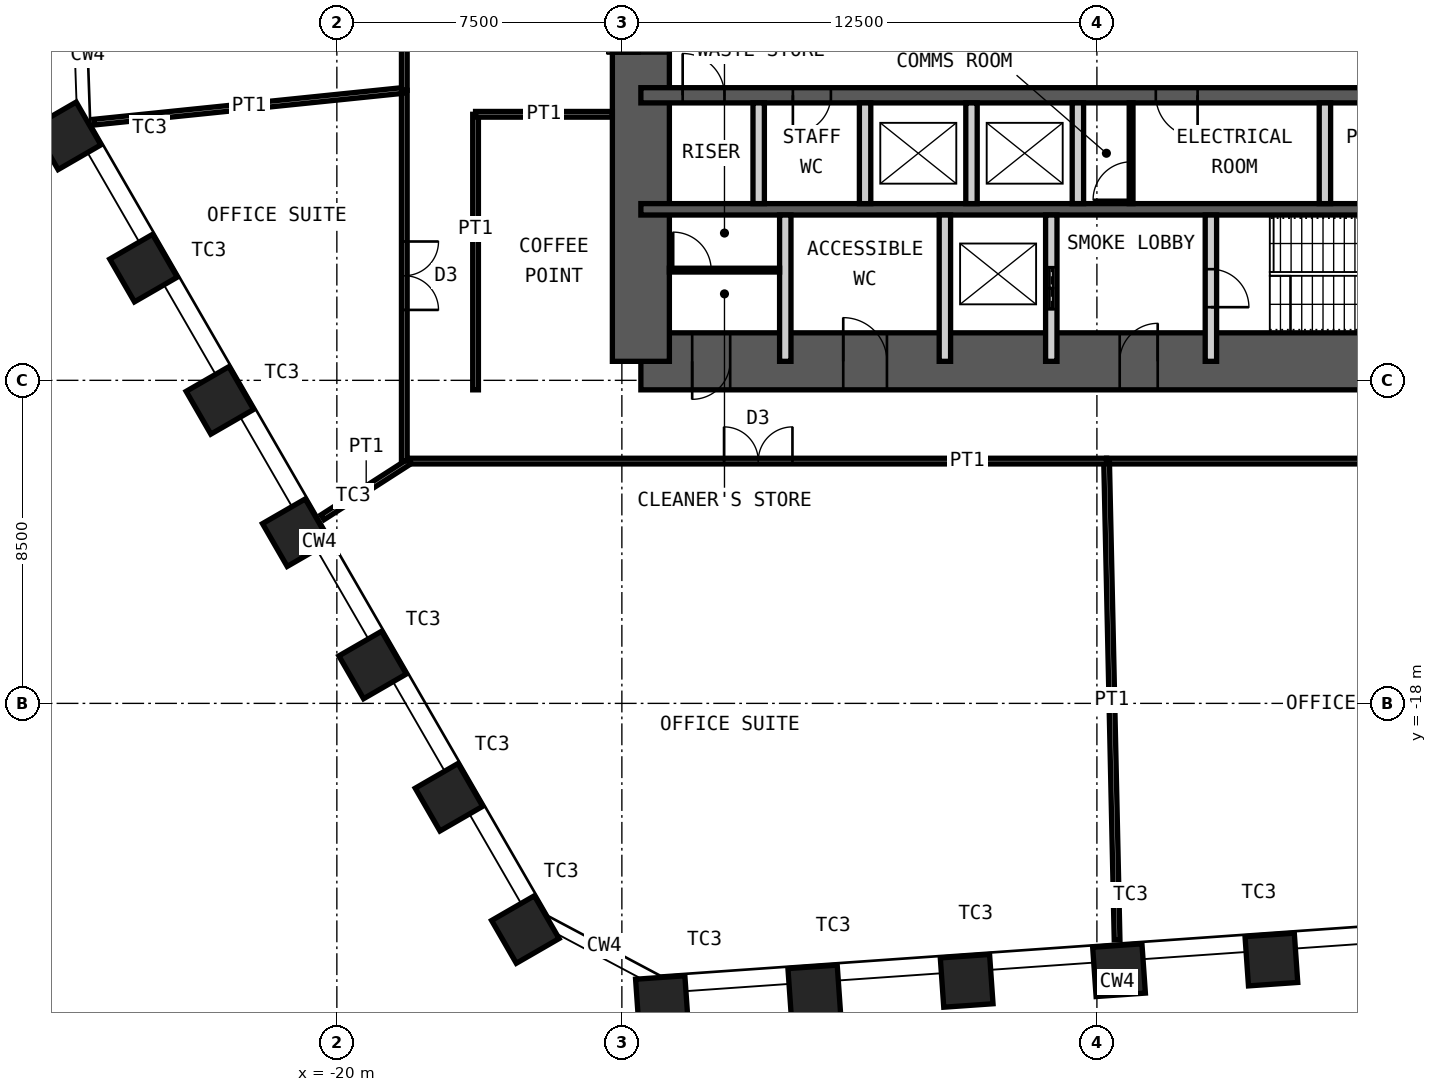
"""IFC4 building model, lengths in metres.
Left out: names, types, materials, properties, quantities, classifications, styles, units other than length and angle.
Written with IfcOpenShell. Run it as: python <this file> out.ifc"""

import sys

from ifc_helpers import new_model, si_unit, direction, frame, frame_2d, origin, origin_2d, place, context, subcontext, project, spatial, rectangle, hollow_rectangle, extrude, element, fill, save


model = new_model("IFC4")
c1 = context("Model", 3, precision=1e-05, world=origin(), true_north=direction((0.0, 1.0)))
c2 = subcontext(c1, "Body", "Model", "MODEL_VIEW")
j1 = project(units=[si_unit("LENGTHUNIT", "METRE"), si_unit("PLANEANGLEUNIT", "RADIAN")], contexts=[c1])
p1 = place(None, origin())
s1 = spatial("IfcSite", under=j1, at=p1, CompositionType="ELEMENT")
p2 = place(p1, origin())
s2 = spatial("IfcBuilding", under=s1, at=p2, CompositionType="ELEMENT")
p3 = place(p2, frame((0.0, 0.0, 136.6)))
s3 = spatial("IfcBuildingStorey", under=s2, at=p3, CompositionType="ELEMENT", Elevation=136.6)
for number, where, z_axis, x_axis in (
    (1, (4.592, -24.74, 0.0), (0.0, 0.0, 1.0), (0.998, 0.07, 0.0)),
    (2, (0.582, -25.02, 0.0), (0.0, 0.0, 1.0), (0.998, 0.07, 0.0)),
    (3, (-3.427, -25.301, 0.0), (0.0, 0.0, 1.0), (0.998, 0.07, 0.0)),
    (4, (-7.436, -25.581, 0.0), (0.0, 0.0, 1.0), (0.998, 0.07, 0.0)),
    (5, (-11.446, -25.861, 0.0), (0.0, 0.0, 1.0), (0.998, 0.07, 0.0)),
    (6, (-15.04, -23.95, 0.0), (0.0, 0.0, 1.0), (0.5, -0.866, 0.0)),
    (7, (-17.049, -20.47, 0.0), (0.0, 0.0, 1.0), (0.5, -0.866, 0.0)),
    (8, (-19.059, -16.989, 0.0), (0.0, 0.0, 1.0), (0.5, -0.866, 0.0)),
    (9, (-21.068, -13.509, 0.0), (0.0, 0.0, 1.0), (0.5, -0.866, 0.0)),
    (10, (-23.078, -10.028, 0.0), (0.0, 0.0, 1.0), (0.5, -0.866, 0.0)),
    (11, (-25.087, -6.547, 0.0), (0.0, 0.0, 1.0), (0.5, -0.866, 0.0)),
    (12, (-27.097, -3.067, 0.0), (0.0, 0.0, 1.0), (0.5, -0.866, 0.0)),
):
    element("IfcColumn", number, at=place(p3, frame(where, z_axis=z_axis, x_axis=x_axis)), inside=s3, PredefinedType="COLUMN", context=c2, shape_type="SweptSolid", body=[
        extrude(hollow_rectangle(XDim=1.3, YDim=1.3, WallThickness=0.1, at=origin_2d()), origin(), (0.0, 0.0, 1.0), 4.2),
    ])
p4 = place(p3, frame((-12.0, -9.0, 0.0), z_axis=(0.0, 0.0, 1.0), x_axis=(1.0, 0.0, 0.0)))
e13 = element("IfcWall", 13, at=p4, inside=s3, PredefinedType="SHEAR", context=c2, shape_type="SweptSolid", body=[
    extrude(rectangle(XDim=24.0, YDim=1.5, at=frame_2d((12.0, 0.0))), origin(), (0.0, 0.0, 1.0), 4.2),
])
p5 = place(p4, frame((1.35, 0.0, 0.0)))
e14 = element("IfcOpeningElement", 14, at=p5, cuts=e13, PredefinedType="OPENING", context=c2, shape_type="SweptSolid", body=[
    extrude(rectangle(XDim=1.0, YDim=2.1, at=frame_2d((0.5, 1.05))), frame((0.0, 0.76, 0.0), z_axis=(0.0, -1.0, 0.0), x_axis=(1.0, 0.0, 0.0)), (0.0, 0.0, 1.0), 1.52),
])
p6 = place(p4, frame((5.325, 0.0, 0.0)))
e15 = element("IfcOpeningElement", 15, at=p6, cuts=e13, PredefinedType="OPENING", context=c2, shape_type="SweptSolid", body=[
    extrude(rectangle(XDim=1.15, YDim=2.1, at=frame_2d((0.575, 1.05))), frame((0.0, 0.76, 0.0), z_axis=(0.0, -1.0, 0.0), x_axis=(1.0, 0.0, 0.0)), (0.0, 0.0, 1.0), 1.52),
])
p7 = place(p4, frame((12.6, 0.0, 0.0)))
e16 = element("IfcOpeningElement", 16, at=p7, cuts=e13, PredefinedType="OPENING", context=c2, shape_type="SweptSolid", body=[
    extrude(rectangle(XDim=1.0, YDim=2.1, at=frame_2d((0.5, 1.05))), frame((0.0, 0.76, 0.0), z_axis=(0.0, -1.0, 0.0), x_axis=(1.0, 0.0, 0.0)), (0.0, 0.0, 1.0), 1.52),
])
p8 = place(p3, frame((-12.0, -9.0, 0.0), z_axis=(0.0, 0.0, 1.0), x_axis=(0.0, 1.0, 0.0)))
e17 = element("IfcWall", 17, at=p8, inside=s3, PredefinedType="SHEAR", context=c2, shape_type="SweptSolid", body=[
    extrude(rectangle(XDim=18.0, YDim=1.5, at=frame_2d((9.0, 0.0))), origin(), (0.0, 0.0, 1.0), 4.2),
])
p9 = place(p8, frame((8.1, 0.0, 0.0)))
e18 = element("IfcOpeningElement", 18, at=p9, cuts=e17, PredefinedType="OPENING", context=c2, shape_type="SweptSolid", body=[
    extrude(rectangle(XDim=1.8, YDim=2.1, at=frame_2d((0.9, 1.05))), frame((0.0, 0.76, 0.0), z_axis=(0.0, -1.0, 0.0), x_axis=(1.0, 0.0, 0.0)), (0.0, 0.0, 1.0), 1.52),
])
p10 = place(p3, frame((-12.0, -2.0, 0.0), z_axis=(0.0, 0.0, 1.0), x_axis=(1.0, 0.0, 0.0)))
e19 = element("IfcWall", 19, at=p10, inside=s3, PredefinedType="SHEAR", context=c2, shape_type="SweptSolid", body=[
    extrude(rectangle(XDim=24.0, YDim=0.4, at=frame_2d((12.0, 0.0))), origin(), (0.0, 0.0, 1.0), 4.2),
])
p11 = place(p10, frame((1.1, 0.0, 0.0)))
e20 = element("IfcOpeningElement", 20, at=p11, cuts=e19, PredefinedType="OPENING", context=c2, shape_type="SweptSolid", body=[
    extrude(rectangle(XDim=1.1, YDim=2.1, at=frame_2d((0.55, 1.05))), frame((0.0, 0.21, 0.0), z_axis=(0.0, -1.0, 0.0), x_axis=(1.0, 0.0, 0.0)), (0.0, 0.0, 1.0), 0.42),
])
p12 = place(p10, frame((13.55, 0.0, 0.0)))
e21 = element("IfcOpeningElement", 21, at=p12, cuts=e19, PredefinedType="OPENING", context=c2, shape_type="SweptSolid", body=[
    extrude(rectangle(XDim=1.1, YDim=2.1, at=frame_2d((0.55, 1.05))), frame((0.0, 0.21, 0.0), z_axis=(0.0, -1.0, 0.0), x_axis=(1.0, 0.0, 0.0)), (0.0, 0.0, 1.0), 0.42),
])
p13 = place(p10, frame((20.7, 0.0, 0.0)))
e22 = element("IfcOpeningElement", 22, at=p13, cuts=e19, PredefinedType="OPENING", context=c2, shape_type="SweptSolid", body=[
    extrude(rectangle(XDim=1.1, YDim=2.1, at=frame_2d((0.55, 1.05))), frame((0.0, 0.21, 0.0), z_axis=(0.0, -1.0, 0.0), x_axis=(1.0, 0.0, 0.0)), (0.0, 0.0, 1.0), 0.42),
])
p14 = place(p10, frame((4.0, 0.0, 0.0)))
e23 = element("IfcOpeningElement", 23, at=p14, cuts=e19, PredefinedType="OPENING", context=c2, shape_type="SweptSolid", body=[
    extrude(rectangle(XDim=1.0, YDim=2.1, at=frame_2d((0.5, 1.05))), frame((0.0, 0.21, 0.0), z_axis=(0.0, -1.0, 0.0), x_axis=(1.0, 0.0, 0.0)), (0.0, 0.0, 1.0), 0.42),
])
p15 = place(p3, frame((-12.0, -5.0, 0.0), z_axis=(0.0, 0.0, 1.0), x_axis=(1.0, 0.0, 0.0)))
e24 = element("IfcWall", 24, at=p15, inside=s3, PredefinedType="SHEAR", context=c2, shape_type="SweptSolid", body=[
    extrude(rectangle(XDim=24.0, YDim=0.3, at=frame_2d((12.0, 0.0))), origin(), (0.0, 0.0, 1.0), 4.2),
])
for number, where, z_axis, x_axis in (
    (25, (-8.9, -4.85, 0.0), (0.0, 0.0, 1.0), (0.0, 1.0, 0.0)),
    (26, (-6.1, -4.85, 0.0), (0.0, 0.0, 1.0), (0.0, 1.0, 0.0)),
    (27, (-3.3, -4.85, 0.0), (0.0, 0.0, 1.0), (0.0, 1.0, 0.0)),
    (28, (-0.5, -4.85, 0.0), (0.0, 0.0, 1.0), (0.0, 1.0, 0.0)),
    (29, (6.0, -4.85, 0.0), (0.0, 0.0, 1.0), (0.0, 1.0, 0.0)),
):
    element("IfcWall", number, at=place(p3, frame(where, z_axis=z_axis, x_axis=x_axis)), inside=s3, PredefinedType="PARTITIONING", context=c2, shape_type="SweptSolid", body=[
        extrude(rectangle(XDim=2.65, YDim=0.3, at=frame_2d((1.325, 0.0))), origin(), (0.0, 0.0, 1.0), 3.98),
    ])
for number, where, z_axis, x_axis in (
    (30, (-8.2, -9.0, 0.0), (0.0, 0.0, 1.0), (0.0, 1.0, 0.0)),
    (31, (-4.0, -9.0, 0.0), (0.0, 0.0, 1.0), (0.0, 1.0, 0.0)),
):
    element("IfcWall", number, at=place(p3, frame(where, z_axis=z_axis, x_axis=x_axis)), inside=s3, PredefinedType="PARTITIONING", context=c2, shape_type="SweptSolid", body=[
        extrude(rectangle(XDim=3.85, YDim=0.3, at=frame_2d((1.925, 0.0))), origin(), (0.0, 0.0, 1.0), 3.98),
    ])
p16 = place(p3, frame((-1.2, -9.0, 0.0), z_axis=(0.0, 0.0, 1.0), x_axis=(0.0, 1.0, 0.0)))
e32 = element("IfcWall", 32, at=p16, inside=s3, PredefinedType="PARTITIONING", context=c2, shape_type="SweptSolid", body=[
    extrude(rectangle(XDim=3.85, YDim=0.3, at=frame_2d((1.925, 0.0))), origin(), (0.0, 0.0, 1.0), 3.98),
])
p17 = place(p16, frame((1.375, 0.0, 0.0)))
e33 = element("IfcOpeningElement", 33, at=p17, cuts=e32, PredefinedType="OPENING", context=c2, shape_type="SweptSolid", body=[
    extrude(rectangle(XDim=1.1, YDim=2.4, at=frame_2d((0.55, 1.2))), frame((0.0, 0.16, 0.0), z_axis=(0.0, -1.0, 0.0), x_axis=(1.0, 0.0, 0.0)), (0.0, 0.0, 1.0), 0.32),
])
p18 = place(p3, frame((3.0, -9.0, 0.0), z_axis=(0.0, 0.0, 1.0), x_axis=(0.0, 1.0, 0.0)))
e34 = element("IfcWall", 34, at=p18, inside=s3, PredefinedType="PARTITIONING", context=c2, shape_type="SweptSolid", body=[
    extrude(rectangle(XDim=3.85, YDim=0.3, at=frame_2d((1.925, 0.0))), origin(), (0.0, 0.0, 1.0), 3.98),
])
p19 = place(p18, frame((1.425, 0.0, 0.0)))
e35 = element("IfcOpeningElement", 35, at=p19, cuts=e34, PredefinedType="OPENING", context=c2, shape_type="SweptSolid", body=[
    extrude(rectangle(XDim=1.0, YDim=2.1, at=frame_2d((0.5, 1.05))), frame((0.0, 0.16, 0.0), z_axis=(0.0, -1.0, 0.0), x_axis=(1.0, 0.0, 0.0)), (0.0, 0.0, 1.0), 0.32),
])
p20 = place(p3, frame((0.9, -4.85, 0.0), z_axis=(0.0, 0.0, 1.0), x_axis=(0.0, 1.0, 0.0)))
e36 = element("IfcWall", 36, at=p20, inside=s3, PredefinedType="PARTITIONING", context=c2, shape_type="SweptSolid", body=[
    extrude(rectangle(XDim=2.65, YDim=0.1, at=frame_2d((1.325, 0.0))), origin(), (0.0, 0.0, 1.0), 3.98),
])
p21 = place(p20, frame((0.1, 0.0, 0.0)))
e37 = element("IfcOpeningElement", 37, at=p21, cuts=e36, PredefinedType="OPENING", context=c2, shape_type="SweptSolid", body=[
    extrude(rectangle(XDim=1.0, YDim=2.4, at=frame_2d((0.5, 1.2))), frame((0.0, 0.06, 0.0), z_axis=(0.0, -1.0, 0.0), x_axis=(1.0, 0.0, 0.0)), (0.0, 0.0, 1.0), 0.12),
])
p22 = place(p3, frame((-11.25, -6.6, 0.0), z_axis=(0.0, 0.0, 1.0), x_axis=(1.0, 0.0, 0.0)))
e38 = element("IfcWall", 38, at=p22, inside=s3, PredefinedType="PARTITIONING", context=c2, shape_type="SweptSolid", body=[
    extrude(rectangle(XDim=2.9, YDim=0.1, at=frame_2d((1.45, 0.0))), origin(), (0.0, 0.0, 1.0), 3.98),
])
p23 = place(p22, frame((0.1, 0.0, 0.0)))
e39 = element("IfcOpeningElement", 39, at=p23, cuts=e38, PredefinedType="OPENING", context=c2, shape_type="SweptSolid", body=[
    extrude(rectangle(XDim=1.0, YDim=2.4, at=frame_2d((0.5, 1.2))), frame((0.0, 0.06, 0.0), z_axis=(0.0, -1.0, 0.0), x_axis=(1.0, 0.0, 0.0)), (0.0, 0.0, 1.0), 0.12),
])
p24 = place(p3, frame((17.625, -11.625, 0.0), z_axis=(0.0, 0.0, 1.0), x_axis=(-1.0, 0.0, 0.0)))
e40 = element("IfcWall", 40, at=p24, inside=s3, PredefinedType="PARTITIONING", context=c2, shape_type="SweptSolid", body=[
    extrude(rectangle(XDim=17.37, YDim=0.15, at=frame_2d((8.685, 0.0))), origin(), (0.0, 0.0, 1.0), 4.03),
])
p25 = place(p24, frame((7.785, 0.0, 0.0)))
e41 = element("IfcOpeningElement", 41, at=p25, cuts=e40, PredefinedType="OPENING", context=c2, shape_type="SweptSolid", body=[
    extrude(rectangle(XDim=1.8, YDim=2.4, at=frame_2d((0.9, 1.2))), frame((0.0, 0.085, 0.0), z_axis=(0.0, -1.0, 0.0), x_axis=(1.0, 0.0, 0.0)), (0.0, 0.0, 1.0), 0.17),
])
p26 = place(p3, frame((0.531, -24.222, 0.0), z_axis=(0.0, 0.0, 1.0), x_axis=(-0.021933557026, 0.999759430601, 0.0)))
e42 = element("IfcWall", 42, at=p26, inside=s3, PredefinedType="PARTITIONING", context=c2, shape_type="SweptSolid", body=[
    extrude(rectangle(XDim=12.6, YDim=0.15, at=frame_2d((6.3, 0.0))), origin(), (0.0, 0.0, 1.0), 3.33),
])
p27 = place(p3, frame((0.255, -11.625, 0.0), z_axis=(0.0, 0.0, 1.0), x_axis=(-1.0, 0.0, 0.0)))
e43 = element("IfcWall", 43, at=p27, inside=s3, PredefinedType="PARTITIONING", context=c2, shape_type="SweptSolid", body=[
    extrude(rectangle(XDim=18.332, YDim=0.15, at=frame_2d((9.166, 0.0))), origin(), (0.0, 0.0, 1.0), 4.03),
])
p28 = place(p27, frame((8.266, 0.0, 0.0)))
e44 = element("IfcOpeningElement", 44, at=p28, cuts=e43, PredefinedType="OPENING", context=c2, shape_type="SweptSolid", body=[
    extrude(rectangle(XDim=1.8, YDim=2.4, at=frame_2d((0.9, 1.2))), frame((0.0, 0.085, 0.0), z_axis=(0.0, -1.0, 0.0), x_axis=(1.0, 0.0, 0.0)), (0.0, 0.0, 1.0), 0.17),
])
p29 = place(p3, frame((-20.378, -13.104, 0.0), z_axis=(0.0, 0.0, 1.0), x_axis=(0.841108871346, 0.540865848934, 0.0)))
e45 = element("IfcWall", 45, at=p29, inside=s3, PredefinedType="PARTITIONING", context=c2, shape_type="SweptSolid", body=[
    extrude(rectangle(XDim=2.735, YDim=0.15, at=frame_2d((1.368, 0.0))), origin(), (0.0, 0.0, 1.0), 3.33),
])
p30 = place(p3, frame((-18.225, -11.625, 0.0), z_axis=(0.0, 0.0, 1.0), x_axis=(0.0, 1.0, 0.0)))
e46 = element("IfcWall", 46, at=p30, inside=s3, PredefinedType="PARTITIONING", context=c2, shape_type="SweptSolid", body=[
    extrude(rectangle(XDim=9.756, YDim=0.15, at=frame_2d((4.878, 0.0))), origin(), (0.0, 0.0, 1.0), 4.03),
])
p31 = place(p30, frame((3.978, 0.0, 0.0)))
e47 = element("IfcOpeningElement", 47, at=p31, cuts=e46, PredefinedType="OPENING", context=c2, shape_type="SweptSolid", body=[
    extrude(rectangle(XDim=1.8, YDim=2.4, at=frame_2d((0.9, 1.2))), frame((0.0, 0.085, 0.0), z_axis=(0.0, -1.0, 0.0), x_axis=(1.0, 0.0, 0.0)), (0.0, 0.0, 1.0), 0.17),
])
p32 = place(p3, frame((-26.391, -2.706, 0.0), z_axis=(0.0, 0.0, 1.0), x_axis=(0.994783450774, 0.102009245004, 0.0)))
e48 = element("IfcWall", 48, at=p32, inside=s3, PredefinedType="PARTITIONING", context=c2, shape_type="SweptSolid", body=[
    extrude(rectangle(XDim=8.209, YDim=0.15, at=frame_2d((4.104, 0.0))), origin(), (0.0, 0.0, 1.0), 2.93),
])
p33 = place(p3, frame((-18.225, -1.869, 0.0), z_axis=(0.0, 0.0, 1.0), x_axis=(0.0, 1.0, 0.0)))
e49 = element("IfcWall", 49, at=p33, inside=s3, PredefinedType="PARTITIONING", context=c2, shape_type="SweptSolid", body=[
    extrude(rectangle(XDim=11.865, YDim=0.15, at=frame_2d((5.932, 0.0))), origin(), (0.0, 0.0, 1.0), 4.03),
])
p34 = place(p33, frame((5.032, 0.0, 0.0)))
e50 = element("IfcOpeningElement", 50, at=p34, cuts=e49, PredefinedType="OPENING", context=c2, shape_type="SweptSolid", body=[
    extrude(rectangle(XDim=1.8, YDim=2.4, at=frame_2d((0.9, 1.2))), frame((0.0, 0.085, 0.0), z_axis=(0.0, -1.0, 0.0), x_axis=(1.0, 0.0, 0.0)), (0.0, 0.0, 1.0), 0.17),
])
p35 = place(p3, frame((-16.35, -9.75, 0.0), z_axis=(0.0, 0.0, 1.0), x_axis=(0.0, 1.0, 0.0)))
e51 = element("IfcWall", 51, at=p35, inside=s3, PredefinedType="PARTITIONING", context=c2, shape_type="SweptSolid", body=[
    extrude(rectangle(XDim=7.25, YDim=0.15, at=frame_2d((3.625, 0.0))), origin(), (0.0, 0.0, 1.0), 4.03),
])
p36 = place(p3, frame((-12.75, -2.5, 0.0), z_axis=(0.0, 0.0, 1.0), x_axis=(-1.0, 0.0, 0.0)))
e52 = element("IfcWall", 52, at=p36, inside=s3, PredefinedType="PARTITIONING", context=c2, shape_type="SweptSolid", body=[
    extrude(rectangle(XDim=3.6, YDim=0.15, at=frame_2d((1.8, 0.0))), origin(), (0.0, 0.0, 1.0), 3.33),
])
p37 = place(p5, origin())
e53 = element("IfcDoor", 53, at=p37, inside=s3, OperationType="SINGLE_SWING_LEFT", PredefinedType="DOOR", context=c2, shape_type="SweptSolid", body=[
    extrude(rectangle(XDim=1.0, YDim=2.1, at=frame_2d((0.5, 1.05))), frame((0.0, 0.025, 0.0), z_axis=(0.0, -1.0, 0.0), x_axis=(1.0, 0.0, 0.0)), (0.0, 0.0, 1.0), 0.05),
])
fill(e14, e53)
p38 = place(p6, origin())
e54 = element("IfcDoor", 54, at=p38, inside=s3, OperationType="SINGLE_SWING_RIGHT", PredefinedType="DOOR", context=c2, shape_type="SweptSolid", body=[
    extrude(rectangle(XDim=1.15, YDim=2.1, at=frame_2d((0.575, 1.05))), frame((0.0, 0.025, 0.0), z_axis=(0.0, -1.0, 0.0), x_axis=(1.0, 0.0, 0.0)), (0.0, 0.0, 1.0), 0.05),
])
fill(e15, e54)
p39 = place(p7, origin())
e55 = element("IfcDoor", 55, at=p39, inside=s3, OperationType="SINGLE_SWING_LEFT", PredefinedType="DOOR", context=c2, shape_type="SweptSolid", body=[
    extrude(rectangle(XDim=1.0, YDim=2.1, at=frame_2d((0.5, 1.05))), frame((0.0, 0.025, 0.0), z_axis=(0.0, -1.0, 0.0), x_axis=(1.0, 0.0, 0.0)), (0.0, 0.0, 1.0), 0.05),
])
fill(e16, e55)
p40 = place(p19, origin())
e56 = element("IfcDoor", 56, at=p40, inside=s3, OperationType="SINGLE_SWING_LEFT", PredefinedType="DOOR", context=c2, shape_type="SweptSolid", body=[
    extrude(rectangle(XDim=1.0, YDim=2.1, at=frame_2d((0.5, 1.05))), frame((0.0, 0.025, 0.0), z_axis=(0.0, -1.0, 0.0), x_axis=(1.0, 0.0, 0.0)), (0.0, 0.0, 1.0), 0.05),
])
fill(e35, e56)
p41 = place(p11, origin())
e57 = element("IfcDoor", 57, at=p41, inside=s3, OperationType="SINGLE_SWING_RIGHT", PredefinedType="DOOR", context=c2, shape_type="SweptSolid", body=[
    extrude(rectangle(XDim=1.1, YDim=2.1, at=frame_2d((0.55, 1.05))), frame((0.0, 0.025, 0.0), z_axis=(0.0, -1.0, 0.0), x_axis=(1.0, 0.0, 0.0)), (0.0, 0.0, 1.0), 0.05),
])
fill(e20, e57)
p42 = place(p12, origin())
e58 = element("IfcDoor", 58, at=p42, inside=s3, OperationType="SINGLE_SWING_RIGHT", PredefinedType="DOOR", context=c2, shape_type="SweptSolid", body=[
    extrude(rectangle(XDim=1.1, YDim=2.1, at=frame_2d((0.55, 1.05))), frame((0.0, 0.025, 0.0), z_axis=(0.0, -1.0, 0.0), x_axis=(1.0, 0.0, 0.0)), (0.0, 0.0, 1.0), 0.05),
])
fill(e21, e58)
p43 = place(p9, origin())
e59 = element("IfcDoor", 59, at=p43, inside=s3, OperationType="DOUBLE_DOOR_DOUBLE_SWING", PredefinedType="DOOR", context=c2, shape_type="SweptSolid", body=[
    extrude(rectangle(XDim=1.8, YDim=2.1, at=frame_2d((0.9, 1.05))), frame((0.0, 0.025, 0.0), z_axis=(0.0, -1.0, 0.0), x_axis=(1.0, 0.0, 0.0)), (0.0, 0.0, 1.0), 0.05),
])
fill(e18, e59)
p44 = place(p17, origin())
e60 = element("IfcDoor", 60, at=p44, inside=s3, OperationType="DOUBLE_DOOR_SLIDING", PredefinedType="DOOR", context=c2, shape_type="SweptSolid", body=[
    extrude(rectangle(XDim=1.1, YDim=2.4, at=frame_2d((0.55, 1.2))), frame((0.0, 0.025, 0.0), z_axis=(0.0, -1.0, 0.0), x_axis=(1.0, 0.0, 0.0)), (0.0, 0.0, 1.0), 0.05),
])
fill(e33, e60)
p45 = place(p14, origin())
e61 = element("IfcDoor", 61, at=p45, inside=s3, OperationType="SINGLE_SWING_LEFT", PredefinedType="DOOR", context=c2, shape_type="SweptSolid", body=[
    extrude(rectangle(XDim=1.0, YDim=2.1, at=frame_2d((0.5, 1.05))), frame((0.0, 0.025, 0.0), z_axis=(0.0, -1.0, 0.0), x_axis=(1.0, 0.0, 0.0)), (0.0, 0.0, 1.0), 0.05),
])
fill(e23, e61)
p46 = place(p21, origin())
e62 = element("IfcDoor", 62, at=p46, inside=s3, OperationType="SINGLE_SWING_RIGHT", PredefinedType="DOOR", context=c2, shape_type="SweptSolid", body=[
    extrude(rectangle(XDim=1.0, YDim=2.4, at=frame_2d((0.5, 1.2))), frame((0.0, 0.025, 0.0), z_axis=(0.0, -1.0, 0.0), x_axis=(1.0, 0.0, 0.0)), (0.0, 0.0, 1.0), 0.05),
])
fill(e37, e62)
p47 = place(p23, origin())
e63 = element("IfcDoor", 63, at=p47, inside=s3, OperationType="SINGLE_SWING_RIGHT", PredefinedType="DOOR", context=c2, shape_type="SweptSolid", body=[
    extrude(rectangle(XDim=1.0, YDim=2.4, at=frame_2d((0.5, 1.2))), frame((0.0, 0.025, 0.0), z_axis=(0.0, -1.0, 0.0), x_axis=(1.0, 0.0, 0.0)), (0.0, 0.0, 1.0), 0.05),
])
fill(e39, e63)
p48 = place(p28, origin())
e64 = element("IfcDoor", 64, at=p48, inside=s3, OperationType="DOUBLE_DOOR_DOUBLE_SWING", PredefinedType="DOOR", context=c2, shape_type="SweptSolid", body=[
    extrude(rectangle(XDim=1.8, YDim=2.4, at=frame_2d((0.9, 1.2))), frame((0.0, 0.025, 0.0), z_axis=(0.0, -1.0, 0.0), x_axis=(1.0, 0.0, 0.0)), (0.0, 0.0, 1.0), 0.05),
])
fill(e44, e64)
p49 = place(p31, origin())
e65 = element("IfcDoor", 65, at=p49, inside=s3, OperationType="DOUBLE_DOOR_DOUBLE_SWING", PredefinedType="DOOR", context=c2, shape_type="SweptSolid", body=[
    extrude(rectangle(XDim=1.8, YDim=2.4, at=frame_2d((0.9, 1.2))), frame((0.0, 0.025, 0.0), z_axis=(0.0, -1.0, 0.0), x_axis=(1.0, 0.0, 0.0)), (0.0, 0.0, 1.0), 0.05),
])
fill(e47, e65)
save(model, sys.argv[1])
